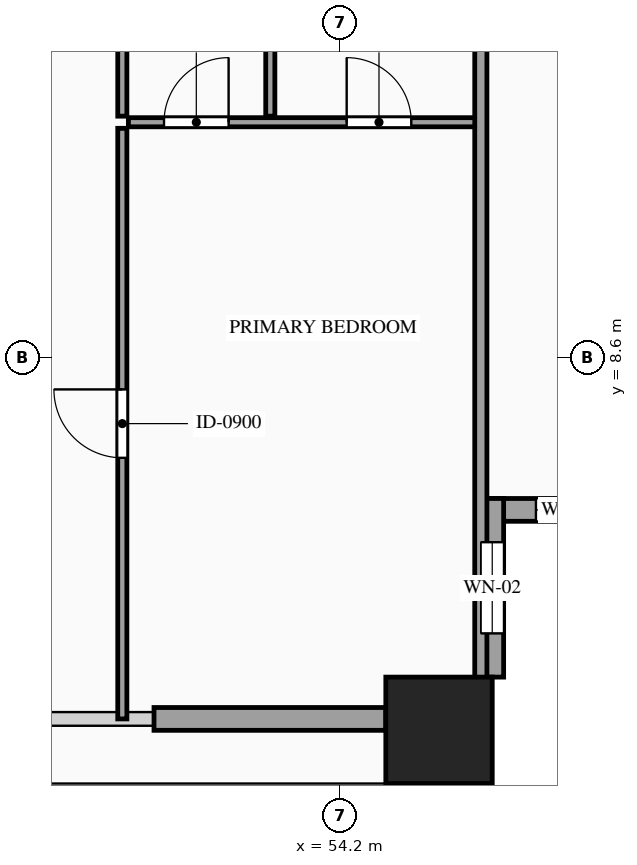
"""IFC4 building model, lengths in metres.
Left out: names, types, materials, properties, quantities, classifications, styles, units other than length and angle.
Written with IfcOpenShell. Run it as: python <this file> out.ifc"""

import sys

from ifc_helpers import new_model, si_unit, direction, frame, frame_2d, origin, origin_2d, place, context, subcontext, project, spatial, rectangle, hollow_rectangle, extrude, source, transform, mapped, element, fill, save


model = new_model("IFC4")
c1 = context("Model", 3, precision=1e-05, world=origin(), true_north=direction((0.0, 1.0)))
c2 = subcontext(c1, "Body", "Model", "MODEL_VIEW")
j1 = project(units=[si_unit("LENGTHUNIT", "METRE"), si_unit("PLANEANGLEUNIT", "RADIAN")], contexts=[c1])
p1 = place(None, origin())
s1 = spatial("IfcSite", under=j1, at=p1, CompositionType="ELEMENT")
p2 = place(p1, origin())
s2 = spatial("IfcBuilding", under=s1, at=p2, CompositionType="ELEMENT")
p3 = place(p2, frame((0.0, 0.0, 198.5)))
s3 = spatial("IfcBuildingStorey", under=s2, at=p3, CompositionType="ELEMENT", Elevation=198.5)
m1 = source(origin(), c2, "Body", "SweptSolid", [
    extrude(hollow_rectangle(XDim=1.4, YDim=1.4, WallThickness=0.06, at=origin_2d()), origin(), (0.0, 0.0, 1.0), 3.5),
])
p4 = place(p3, frame((55.5, 3.7, 0.0), z_axis=(0.0, 0.0, 1.0), x_axis=(1.0, 0.0, 0.0)))
e1 = element("IfcColumn", 1, at=p4, inside=s3, PredefinedType="COLUMN", context=c2, shape_type="MappedRepresentation", body=[
    mapped(m1, transform((0.0, 0.0, 0.0), scale=1.0)),
])
p5 = place(p3, frame((56.05, 6.6, 0.0), z_axis=(0.0, 0.0, 1.0), x_axis=(1.0, 0.0, 0.0)))
e2 = element("IfcWall", 2, at=p5, inside=s3, PredefinedType="SOLIDWALL", context=c2, shape_type="SweptSolid", body=[
    extrude(rectangle(XDim=2.35, YDim=0.3, at=frame_2d((1.175, 0.0))), origin(), (0.0, 0.0, 1.0), 3.28),
])
p6 = place(p5, frame((0.725, 0.0, 0.85)))
e3 = element("IfcOpeningElement", 3, at=p6, cuts=e2, PredefinedType="OPENING", context=c2, shape_type="SweptSolid", body=[
    extrude(rectangle(XDim=0.9, YDim=1.5, at=frame_2d((0.45, 0.75))), frame((0.0, 0.165, 0.0), z_axis=(0.0, -1.0, 0.0), x_axis=(1.0, 0.0, 0.0)), (0.0, 0.0, 1.0), 0.33),
])
p7 = place(p3, frame((56.2, 4.4, 0.0), z_axis=(0.0, 0.0, 1.0), x_axis=(0.0, 1.0, 0.0)))
e4 = element("IfcWall", 4, at=p7, inside=s3, PredefinedType="SOLIDWALL", context=c2, shape_type="SweptSolid", body=[
    extrude(rectangle(XDim=2.35, YDim=0.3, at=frame_2d((1.175, 0.0))), origin(), (0.0, 0.0, 1.0), 3.28),
])
p8 = place(p7, frame((0.575, 0.0, 0.85)))
e5 = element("IfcOpeningElement", 5, at=p8, cuts=e4, PredefinedType="OPENING", context=c2, shape_type="SweptSolid", body=[
    extrude(rectangle(XDim=1.2, YDim=2.1, at=frame_2d((0.6, 1.05))), frame((0.0, 0.165, 0.0), z_axis=(0.0, -1.0, 0.0), x_axis=(1.0, 0.0, 0.0)), (0.0, 0.0, 1.0), 0.33),
])
m2 = source(origin(), c2, "Body", "SweptSolid", [
    extrude(rectangle(XDim=3.05, YDim=0.3, at=frame_2d((1.525, 0.0))), origin(), (0.0, 0.0, 1.0), 2.835),
])
p9 = place(p3, frame((51.75, 3.85, 0.0), z_axis=(0.0, 0.0, 1.0), x_axis=(1.0, 0.0, 0.0)))
e6 = element("IfcWall", 6, at=p9, inside=s3, PredefinedType="SOLIDWALL", context=c2, shape_type="MappedRepresentation", body=[
    mapped(m2, transform((0.0, 0.0, 0.0), scale=1.0)),
])
m3 = source(origin(), c2, "Body", "SweptSolid", [
    extrude(rectangle(XDim=5.61, YDim=0.12, at=frame_2d((2.805, 0.0))), origin(), (0.0, 0.0, 1.0), 3.28),
])
for number, where, z_axis, x_axis in (
    (7, (53.28, 11.78, 0.0), (0.0, 0.0, 1.0), (0.0, 1.0, 0.0)),
    (8, (51.333, 11.78, 0.0), (0.0, 0.0, 1.0), (0.0, 1.0, 0.0)),
):
    element("IfcWall", number, at=place(p3, frame(where, z_axis=z_axis, x_axis=x_axis)), inside=s3, PredefinedType="PARTITIONING", context=c2, shape_type="MappedRepresentation", body=[
        mapped(m3, transform((0.0, 0.0, 0.0), scale=1.0)),
    ])
p10 = place(p3, frame((51.413, 11.7, 0.0), z_axis=(0.0, 0.0, 1.0), x_axis=(1.0, 0.0, 0.0)))
e9 = element("IfcWall", 9, at=p10, inside=s3, PredefinedType="PARTITIONING", context=c2, shape_type="SweptSolid", body=[
    extrude(rectangle(XDim=4.647, YDim=0.12, at=frame_2d((2.323, 0.0))), origin(), (0.0, 0.0, 1.0), 3.28),
])
p11 = place(p10, frame((2.872, 0.0, 0.0)))
e10 = element("IfcOpeningElement", 10, at=p11, cuts=e9, PredefinedType="OPENING", context=c2, shape_type="SweptSolid", body=[
    extrude(rectangle(XDim=0.85, YDim=2.1, at=frame_2d((0.425, 1.05))), frame((0.0, 0.075, 0.0), z_axis=(0.0, -1.0, 0.0), x_axis=(1.0, 0.0, 0.0)), (0.0, 0.0, 1.0), 0.15),
])
p12 = place(p10, frame((0.469, 0.0, 0.0)))
e11 = element("IfcOpeningElement", 11, at=p12, cuts=e9, PredefinedType="OPENING", context=c2, shape_type="SweptSolid", body=[
    extrude(rectangle(XDim=0.85, YDim=2.1, at=frame_2d((0.425, 1.05))), frame((0.0, 0.075, 0.0), z_axis=(0.0, -1.0, 0.0), x_axis=(1.0, 0.0, 0.0)), (0.0, 0.0, 1.0), 0.15),
])
p13 = place(p3, frame((51.333, 3.85, 0.0), z_axis=(0.0, 0.0, 1.0), x_axis=(0.0, 1.0, 0.0)))
e12 = element("IfcWall", 12, at=p13, inside=s3, PredefinedType="PARTITIONING", context=c2, shape_type="SweptSolid", body=[
    extrude(rectangle(XDim=7.77, YDim=0.12, at=frame_2d((3.885, 0.0))), origin(), (0.0, 0.0, 1.0), 3.28),
])
p14 = place(p13, frame((3.435, 0.0, 0.0)))
e13 = element("IfcOpeningElement", 13, at=p14, cuts=e12, PredefinedType="OPENING", context=c2, shape_type="SweptSolid", body=[
    extrude(rectangle(XDim=0.9, YDim=2.15, at=frame_2d((0.45, 1.075))), frame((0.0, 0.075, 0.0), z_axis=(0.0, -1.0, 0.0), x_axis=(1.0, 0.0, 0.0)), (0.0, 0.0, 1.0), 0.15),
])
m4 = source(origin(), c2, "Body", "SweptSolid", [
    extrude(rectangle(XDim=28.19, YDim=0.16, at=frame_2d((14.095, 0.0))), origin(), (0.0, 0.0, 1.0), 3.28),
])
p15 = place(p3, frame((56.05, 4.0, 0.0), z_axis=(0.0, 0.0, 1.0), x_axis=(0.0, 1.0, 0.0)))
e14 = element("IfcWall", 14, at=p15, inside=s3, PredefinedType="PARTITIONING", context=c2, shape_type="MappedRepresentation", body=[
    mapped(m4, transform((0.0, 0.0, 0.0), scale=1.0)),
])
m5 = source(origin(), c2, "Body", "SweptSolid", [
    extrude(rectangle(XDim=0.9, YDim=1.5, at=frame_2d((0.45, 0.75))), frame((0.0, 0.03, 0.0), z_axis=(0.0, -1.0, 0.0), x_axis=(1.0, 0.0, 0.0)), (0.0, 0.0, 1.0), 0.06),
])
p16 = place(p6, origin())
e15 = element("IfcWindow", 15, at=p16, inside=s3, PartitioningType="SINGLE_PANEL", PredefinedType="WINDOW", context=c2, shape_type="MappedRepresentation", body=[
    mapped(m5, transform((0.0, 0.0, 0.0), scale=1.0)),
])
fill(e3, e15)
m6 = source(origin(), c2, "Body", "SweptSolid", [
    extrude(rectangle(XDim=1.2, YDim=2.1, at=frame_2d((0.6, 1.05))), frame((0.0, 0.03, 0.0), z_axis=(0.0, -1.0, 0.0), x_axis=(1.0, 0.0, 0.0)), (0.0, 0.0, 1.0), 0.06),
])
p17 = place(p8, origin())
e16 = element("IfcWindow", 16, at=p17, inside=s3, PartitioningType="SINGLE_PANEL", PredefinedType="WINDOW", context=c2, shape_type="MappedRepresentation", body=[
    mapped(m6, transform((0.0, 0.0, 0.0), scale=1.0)),
])
fill(e5, e16)
m7 = source(origin(), c2, "Body", "SweptSolid", [
    extrude(rectangle(XDim=0.85, YDim=2.1, at=frame_2d((0.425, 1.05))), frame((0.0, 0.025, 0.0), z_axis=(0.0, -1.0, 0.0), x_axis=(1.0, 0.0, 0.0)), (0.0, 0.0, 1.0), 0.05),
])
p18 = place(p11, origin())
e17 = element("IfcDoor", 17, at=p18, inside=s3, OperationType="SINGLE_SWING_LEFT", PredefinedType="DOOR", context=c2, shape_type="MappedRepresentation", body=[
    mapped(m7, transform((0.0, 0.0, 0.0), scale=1.0)),
])
fill(e10, e17)
p19 = place(p12, origin())
e18 = element("IfcDoor", 18, at=p19, inside=s3, OperationType="SINGLE_SWING_RIGHT", PredefinedType="DOOR", context=c2, shape_type="MappedRepresentation", body=[
    mapped(m7, transform((0.0, 0.0, 0.0), scale=1.0)),
])
fill(e11, e18)
m8 = source(origin(), c2, "Body", "SweptSolid", [
    extrude(rectangle(XDim=0.9, YDim=2.15, at=frame_2d((0.45, 1.075))), frame((0.0, 0.025, 0.0), z_axis=(0.0, -1.0, 0.0), x_axis=(1.0, 0.0, 0.0)), (0.0, 0.0, 1.0), 0.05),
])
p20 = place(p14, origin())
e19 = element("IfcDoor", 19, at=p20, inside=s3, OperationType="SINGLE_SWING_RIGHT", PredefinedType="DOOR", context=c2, shape_type="MappedRepresentation", body=[
    mapped(m8, transform((0.0, 0.0, 0.0), scale=1.0)),
])
fill(e13, e19)
save(model, sys.argv[1])
